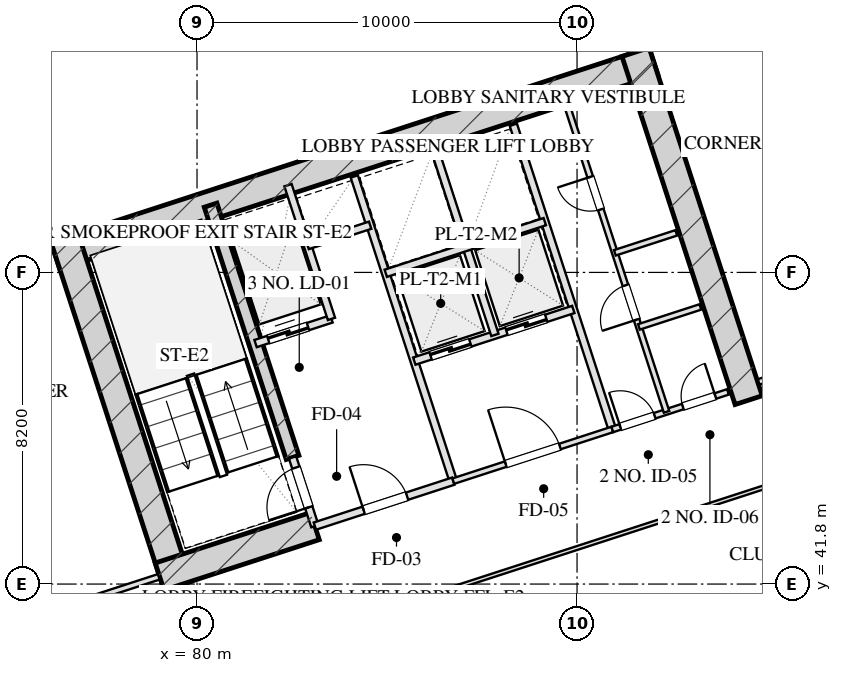
"""IFC4 building model, lengths in metres.
Left out: names, types, materials, properties, quantities, classifications, styles, units other than length and angle.
Written with IfcOpenShell. Run it as: python <this file> out.ifc"""

import sys

from ifc_helpers import new_model, si_unit, direction, frame, frame_2d, origin, place, context, subcontext, project, spatial, rectangle, extrude, element, fill, save


model = new_model("IFC4")
c1 = context("Model", 3, precision=1e-05, world=origin(), true_north=direction((0.0, 1.0)))
c2 = subcontext(c1, "Body", "Model", "MODEL_VIEW")
j1 = project(units=[si_unit("LENGTHUNIT", "METRE"), si_unit("PLANEANGLEUNIT", "RADIAN")], contexts=[c1])
p1 = place(None, origin())
s1 = spatial("IfcSite", under=j1, at=p1, CompositionType="ELEMENT")
p2 = place(p1, origin())
s2 = spatial("IfcBuilding", under=s1, at=p2, CompositionType="ELEMENT")
p3 = place(p2, frame((0.0, 0.0, 81.65)))
s3 = spatial("IfcBuildingStorey", under=s2, at=p3, CompositionType="ELEMENT", Elevation=81.65)
p4 = place(p3, frame((76.272, 50.443, 0.0), z_axis=(0.0, 0.0, 1.0), x_axis=(0.951056072937, 0.309018358888, 0.0)))
e1 = element("IfcWall", 1, at=p4, inside=s3, PredefinedType="SHEAR", context=c2, shape_type="SweptSolid", body=[
    extrude(rectangle(XDim=16.55, YDim=0.75, at=frame_2d((8.275, 0.0))), origin(), (0.0, 0.0, 1.0), 3.45),
])
for number, where, z_axis, x_axis in (
    (2, (79.489, 41.756, 0.0), (0.0, 0.0, 1.0), (-0.309, 0.951, 0.0)),
    (3, (94.515, 46.639, 0.0), (0.0, 0.0, 1.0), (-0.309, 0.951, 0.0)),
):
    element("IfcWall", number, at=place(p3, frame(where, z_axis=z_axis, x_axis=x_axis)), inside=s3, PredefinedType="SHEAR", context=c2, shape_type="SweptSolid", body=[
        extrude(rectangle(XDim=9.63, YDim=0.75, at=frame_2d((4.815, 0.0))), origin(), (0.0, 0.0, 1.0), 3.45),
    ])
p5 = place(p3, frame((82.514, 45.131, 0.0), z_axis=(0.0, 0.0, 1.0), x_axis=(-0.308988790936, 0.951065679686, 0.0)))
e4 = element("IfcWall", 4, at=p5, inside=s3, PredefinedType="SHEAR", context=c2, shape_type="SweptSolid", body=[
    extrude(rectangle(XDim=6.98, YDim=0.35, at=frame_2d((3.49, 0.0))), origin(), (0.0, 0.0, 1.0), 3.45),
])
p6 = place(p3, frame((79.016, 41.997, 0.0), z_axis=(0.0, 0.0, 1.0), x_axis=(0.95106038264, 0.309005094736, 0.0)))
e5 = element("IfcWall", 5, at=p6, inside=s3, PredefinedType="SHEAR", context=c2, shape_type="SweptSolid", body=[
    extrude(rectangle(XDim=4.295, YDim=0.75, at=frame_2d((2.147, 0.0))), origin(), (0.0, 0.0, 1.0), 3.45),
])
p7 = place(p3, frame((80.716, 6.59, 0.0), z_axis=(0.0, 0.0, 1.0), x_axis=(-0.309017542002, 0.95105633836, 0.0)))
e6 = element("IfcWall", 6, at=p7, inside=s3, PredefinedType="SOLIDWALL", context=c2, shape_type="SweptSolid", body=[
    extrude(rectangle(XDim=46.4, YDim=0.4, at=frame_2d((23.2, 0.0))), origin(), (0.0, 0.0, 1.0), 2.61),
])
p8 = place(p7, frame((24.6, 0.0, 0.75)))
e7 = element("IfcOpeningElement", 7, at=p8, cuts=e6, PredefinedType="OPENING", context=c2, shape_type="SweptSolid", body=[
    extrude(rectangle(XDim=2.4, YDim=1.46, at=frame_2d((1.2, 0.73))), frame((0.0, 0.21, 0.0), z_axis=(0.0, -1.0, 0.0), x_axis=(1.0, 0.0, 0.0)), (0.0, 0.0, 1.0), 0.42),
])
p9 = place(p7, frame((28.4, 0.0, 0.75)))
e8 = element("IfcOpeningElement", 8, at=p9, cuts=e6, PredefinedType="OPENING", context=c2, shape_type="SweptSolid", body=[
    extrude(rectangle(XDim=2.4, YDim=1.46, at=frame_2d((1.2, 0.73))), frame((0.0, 0.21, 0.0), z_axis=(0.0, -1.0, 0.0), x_axis=(1.0, 0.0, 0.0)), (0.0, 0.0, 1.0), 0.42),
])
p10 = place(p7, frame((18.25, 0.0, 0.0)))
e9 = element("IfcOpeningElement", 9, at=p10, cuts=e6, PredefinedType="OPENING", context=c2, shape_type="SweptSolid", body=[
    extrude(rectangle(XDim=1.1, YDim=2.15, at=frame_2d((0.55, 1.075))), frame((0.0, 0.21, 0.0), z_axis=(0.0, -1.0, 0.0), x_axis=(1.0, 0.0, 0.0)), (0.0, 0.0, 1.0), 0.42),
])
p11 = place(p3, frame((68.047, 53.995, 0.0), z_axis=(0.0, 0.0, 1.0), x_axis=(0.95105505922, 0.309021478754, 0.0)))
e10 = element("IfcWall", 10, at=p11, inside=s3, PredefinedType="SOLIDWALL", context=c2, shape_type="SweptSolid", body=[
    extrude(rectangle(XDim=29.4, YDim=0.4, at=frame_2d((14.7, 0.0))), origin(), (0.0, 0.0, 1.0), 2.61),
])
p12 = place(p3, frame((83.101, 43.324, 0.0), z_axis=(0.0, 0.0, 1.0), x_axis=(-0.309048298632, 0.951046344356, 0.0)))
e11 = element("IfcWall", 11, at=p12, inside=s3, PredefinedType="PARTITIONING", context=c2, shape_type="SweptSolid", body=[
    extrude(rectangle(XDim=1.9, YDim=0.2, at=frame_2d((0.95, 0.0))), origin(), (0.0, 0.0, 1.0), 3.175),
])
p13 = place(p12, frame((0.52, 0.0, 0.0)))
e12 = element("IfcOpeningElement", 12, at=p13, cuts=e11, PredefinedType="OPENING", context=c2, shape_type="SweptSolid", body=[
    extrude(rectangle(XDim=1.1, YDim=2.05, at=frame_2d((0.55, 1.025))), frame((0.0, 0.11, 0.0), z_axis=(0.0, -1.0, 0.0), x_axis=(1.0, 0.0, 0.0)), (0.0, 0.0, 1.0), 0.22),
])
p14 = place(p3, frame((86.743, 44.508, 0.0), z_axis=(0.0, 0.0, 1.0), x_axis=(-0.309016001439, 0.951056838919, 0.0)))
e13 = element("IfcWall", 13, at=p14, inside=s3, PredefinedType="PARTITIONING", context=c2, shape_type="SweptSolid", body=[
    extrude(rectangle(XDim=8.43, YDim=0.2, at=frame_2d((4.215, 0.0))), origin(), (0.0, 0.0, 1.0), 3.175),
])
p15 = place(p3, frame((83.101, 43.324, 0.0), z_axis=(0.0, 0.0, 1.0), x_axis=(0.951052804469, 0.309028417967, 0.0)))
e14 = element("IfcWall", 14, at=p15, inside=s3, PredefinedType="PARTITIONING", context=c2, shape_type="SweptSolid", body=[
    extrude(rectangle(XDim=3.83, YDim=0.2, at=frame_2d((1.915, 0.0))), origin(), (0.0, 0.0, 1.0), 3.175),
])
p16 = place(p15, frame((1.35, 0.0, 0.0)))
e15 = element("IfcOpeningElement", 15, at=p16, cuts=e14, PredefinedType="OPENING", context=c2, shape_type="SweptSolid", body=[
    extrude(rectangle(XDim=1.2, YDim=2.05, at=frame_2d((0.6, 1.025))), frame((0.0, 0.11, 0.0), z_axis=(0.0, -1.0, 0.0), x_axis=(1.0, 0.0, 0.0)), (0.0, 0.0, 1.0), 0.22),
])
p17 = place(p3, frame((81.54, 48.127, 0.0), z_axis=(0.0, 0.0, 1.0), x_axis=(0.951062257173, 0.308999325213, 0.0)))
e16 = element("IfcWall", 16, at=p17, inside=s3, PredefinedType="PARTITIONING", context=c2, shape_type="SweptSolid", body=[
    extrude(rectangle(XDim=2.1, YDim=0.2, at=frame_2d((1.05, 0.0))), origin(), (0.0, 0.0, 1.0), 3.175),
])
p18 = place(p17, frame((0.35, 0.0, 0.0)))
e17 = element("IfcOpeningElement", 17, at=p18, cuts=e16, PredefinedType="OPENING", context=c2, shape_type="SweptSolid", body=[
    extrude(rectangle(XDim=1.1, YDim=2.05, at=frame_2d((0.55, 1.025))), frame((0.0, 0.11, 0.0), z_axis=(0.0, -1.0, 0.0), x_axis=(1.0, 0.0, 0.0)), (0.0, 0.0, 1.0), 0.22),
])
p19 = place(p3, frame((83.538, 48.776, 0.0), z_axis=(0.0, 0.0, 1.0), x_axis=(-0.3089935693, 0.951064127245, 0.0)))
e18 = element("IfcWall", 18, at=p19, inside=s3, PredefinedType="PARTITIONING", context=c2, shape_type="SweptSolid", body=[
    extrude(rectangle(XDim=3.7, YDim=0.2, at=frame_2d((1.85, 0.0))), origin(), (0.0, 0.0, 1.0), 3.175),
])
p20 = place(p3, frame((82.91, 50.707, 0.0), z_axis=(0.0, 0.0, 1.0), x_axis=(0.951041328149, 0.309063734775, 0.0)))
e19 = element("IfcWall", 19, at=p20, inside=s3, PredefinedType="PARTITIONING", context=c2, shape_type="SweptSolid", body=[
    extrude(rectangle(XDim=1.73, YDim=0.2, at=frame_2d((0.865, 0.0))), origin(), (0.0, 0.0, 1.0), 3.175),
])
p21 = place(p3, frame((90.928, 45.868, 0.0), z_axis=(0.0, 0.0, 1.0), x_axis=(-0.309042196757, 0.951048327176, 0.0)))
e20 = element("IfcWall", 20, at=p21, inside=s3, PredefinedType="PARTITIONING", context=c2, shape_type="SweptSolid", body=[
    extrude(rectangle(XDim=8.43, YDim=0.2, at=frame_2d((4.215, 0.0))), origin(), (0.0, 0.0, 1.0), 3.175),
])
p22 = place(p3, frame((86.743, 44.508, 0.0), z_axis=(0.0, 0.0, 1.0), x_axis=(0.951063829732, 0.308994485023, 0.0)))
e21 = element("IfcWall", 21, at=p22, inside=s3, PredefinedType="PARTITIONING", context=c2, shape_type="SweptSolid", body=[
    extrude(rectangle(XDim=4.4, YDim=0.15, at=frame_2d((2.2, 0.0))), origin(), (0.0, 0.0, 1.0), 3.175),
])
p23 = place(p22, frame((1.45, 0.0, 0.0)))
e22 = element("IfcOpeningElement", 22, at=p23, cuts=e21, PredefinedType="OPENING", context=c2, shape_type="SweptSolid", body=[
    extrude(rectangle(XDim=1.5, YDim=2.05, at=frame_2d((0.75, 1.025))), frame((0.0, 0.085, 0.0), z_axis=(0.0, -1.0, 0.0), x_axis=(1.0, 0.0, 0.0)), (0.0, 0.0, 1.0), 0.17),
])
p24 = place(p3, frame((85.718, 47.666, 0.0), z_axis=(0.0, 0.0, 1.0), x_axis=(0.951058531764, 0.30901079133, 0.0)))
e23 = element("IfcWall", 23, at=p24, inside=s3, PredefinedType="PARTITIONING", context=c2, shape_type="SweptSolid", body=[
    extrude(rectangle(XDim=4.4, YDim=0.2, at=frame_2d((2.2, 0.0))), origin(), (0.0, 0.0, 1.0), 3.175),
])
p25 = place(p24, frame((0.45, 0.0, 0.0)))
e24 = element("IfcOpeningElement", 24, at=p25, cuts=e23, PredefinedType="OPENING", context=c2, shape_type="SweptSolid", body=[
    extrude(rectangle(XDim=1.1, YDim=2.05, at=frame_2d((0.55, 1.025))), frame((0.0, 0.11, 0.0), z_axis=(0.0, -1.0, 0.0), x_axis=(1.0, 0.0, 0.0)), (0.0, 0.0, 1.0), 0.22),
])
p26 = place(p24, frame((2.55, 0.0, 0.0)))
e25 = element("IfcOpeningElement", 25, at=p26, cuts=e23, PredefinedType="OPENING", context=c2, shape_type="SweptSolid", body=[
    extrude(rectangle(XDim=1.1, YDim=2.05, at=frame_2d((0.55, 1.025))), frame((0.0, 0.11, 0.0), z_axis=(0.0, -1.0, 0.0), x_axis=(1.0, 0.0, 0.0)), (0.0, 0.0, 1.0), 0.22),
])
p27 = place(p3, frame((87.838, 48.354, 0.0), z_axis=(0.0, 0.0, 1.0), x_axis=(-0.3090093719, 0.951058992953, 0.0)))
e26 = element("IfcWall", 26, at=p27, inside=s3, PredefinedType="PARTITIONING", context=c2, shape_type="SweptSolid", body=[
    extrude(rectangle(XDim=5.11, YDim=0.2, at=frame_2d((2.555, 0.0))), origin(), (0.0, 0.0, 1.0), 3.175),
])
p28 = place(p3, frame((84.967, 49.977, 0.0), z_axis=(0.0, 0.0, 1.0), x_axis=(0.951063829732, 0.308994485023, 0.0)))
e27 = element("IfcWall", 27, at=p28, inside=s3, PredefinedType="PARTITIONING", context=c2, shape_type="SweptSolid", body=[
    extrude(rectangle(XDim=4.4, YDim=0.2, at=frame_2d((2.2, 0.0))), origin(), (0.0, 0.0, 1.0), 3.175),
])
p29 = place(p3, frame((90.928, 45.868, 0.0), z_axis=(0.0, 0.0, 1.0), x_axis=(0.951059297078, 0.309008435874, 0.0)))
e28 = element("IfcWall", 28, at=p29, inside=s3, PredefinedType="PARTITIONING", context=c2, shape_type="SweptSolid", body=[
    extrude(rectangle(XDim=3.2, YDim=0.15, at=frame_2d((1.6, 0.0))), origin(), (0.0, 0.0, 1.0), 3.175),
])
p30 = place(p29, frame((0.22, 0.0, 0.0)))
e29 = element("IfcOpeningElement", 29, at=p30, cuts=e28, PredefinedType="OPENING", context=c2, shape_type="SweptSolid", body=[
    extrude(rectangle(XDim=0.95, YDim=2.05, at=frame_2d((0.475, 1.025))), frame((0.0, 0.085, 0.0), z_axis=(0.0, -1.0, 0.0), x_axis=(1.0, 0.0, 0.0)), (0.0, 0.0, 1.0), 0.17),
])
p31 = place(p29, frame((1.95, 0.0, 0.0)))
e30 = element("IfcOpeningElement", 30, at=p31, cuts=e28, PredefinedType="OPENING", context=c2, shape_type="SweptSolid", body=[
    extrude(rectangle(XDim=0.9, YDim=2.05, at=frame_2d((0.45, 1.025))), frame((0.0, 0.085, 0.0), z_axis=(0.0, -1.0, 0.0), x_axis=(1.0, 0.0, 0.0)), (0.0, 0.0, 1.0), 0.17),
])
p32 = place(p3, frame((92.355, 46.331, 0.0), z_axis=(0.0, 0.0, 1.0), x_axis=(-0.309007490203, 0.951059604335, 0.0)))
e31 = element("IfcWall", 31, at=p32, inside=s3, PredefinedType="PARTITIONING", context=c2, shape_type="SweptSolid", body=[
    extrude(rectangle(XDim=8.43, YDim=0.15, at=frame_2d((4.215, 0.0))), origin(), (0.0, 0.0, 1.0), 3.175),
])
p33 = place(p32, frame((2.55, 0.0, 0.0)))
e32 = element("IfcOpeningElement", 32, at=p33, cuts=e31, PredefinedType="OPENING", context=c2, shape_type="SweptSolid", body=[
    extrude(rectangle(XDim=0.95, YDim=2.05, at=frame_2d((0.475, 1.025))), frame((0.0, 0.085, 0.0), z_axis=(0.0, -1.0, 0.0), x_axis=(1.0, 0.0, 0.0)), (0.0, 0.0, 1.0), 0.17),
])
p34 = place(p32, frame((5.6, 0.0, 0.0)))
e33 = element("IfcOpeningElement", 33, at=p34, cuts=e31, PredefinedType="OPENING", context=c2, shape_type="SweptSolid", body=[
    extrude(rectangle(XDim=0.9, YDim=2.05, at=frame_2d((0.45, 1.025))), frame((0.0, 0.085, 0.0), z_axis=(0.0, -1.0, 0.0), x_axis=(1.0, 0.0, 0.0)), (0.0, 0.0, 1.0), 0.17),
])
p35 = place(p3, frame((90.995, 50.516, 0.0), z_axis=(0.0, 0.0, 1.0), x_axis=(0.951040401051, 0.309066587596, 0.0)))
e34 = element("IfcWall", 34, at=p35, inside=s3, PredefinedType="PARTITIONING", context=c2, shape_type="SweptSolid", body=[
    extrude(rectangle(XDim=1.7, YDim=0.15, at=frame_2d((0.85, 0.0))), origin(), (0.0, 0.0, 1.0), 3.175),
])
p36 = place(p3, frame((91.628, 48.566, 0.0), z_axis=(0.0, 0.0, 1.0), x_axis=(0.951054116971, 0.309024378638, 0.0)))
e35 = element("IfcWall", 35, at=p36, inside=s3, PredefinedType="PARTITIONING", context=c2, shape_type="SweptSolid", body=[
    extrude(rectangle(XDim=1.7, YDim=0.15, at=frame_2d((0.85, 0.0))), origin(), (0.0, 0.0, 1.0), 3.175),
])
p37 = place(p3, frame((70.338, 39.177, 0.0), z_axis=(0.0, 0.0, 1.0), x_axis=(0.951059695568, 0.309007209409, 0.0)))
e36 = element("IfcWall", 36, at=p37, inside=s3, PredefinedType="PARTITIONING", context=c2, shape_type="SweptSolid", body=[
    extrude(rectangle(XDim=9.1, YDim=0.15, at=frame_2d((4.55, 0.0))), origin(), (0.0, 0.0, 1.0), 3.175),
])
p38 = place(p37, frame((3.822, 0.0, 0.0)))
e37 = element("IfcOpeningElement", 37, at=p38, cuts=e36, PredefinedType="OPENING", context=c2, shape_type="SweptSolid", body=[
    extrude(rectangle(XDim=1.0, YDim=2.05, at=frame_2d((0.5, 1.025))), frame((0.0, 0.085, 0.0), z_axis=(0.0, -1.0, 0.0), x_axis=(1.0, 0.0, 0.0)), (0.0, 0.0, 1.0), 0.17),
])
p39 = place(p3, frame((94.78, 47.119, 0.0), z_axis=(0.0, 0.0, 1.0), x_axis=(0.951054329824, 0.309023723562, 0.0)))
e38 = element("IfcWall", 38, at=p39, inside=s3, PredefinedType="PARTITIONING", context=c2, shape_type="SweptSolid", body=[
    extrude(rectangle(XDim=8.5, YDim=0.15, at=frame_2d((4.25, 0.0))), origin(), (0.0, 0.0, 1.0), 3.175),
])
p40 = place(p39, frame((3.57, 0.0, 0.0)))
e39 = element("IfcOpeningElement", 39, at=p40, cuts=e38, PredefinedType="OPENING", context=c2, shape_type="SweptSolid", body=[
    extrude(rectangle(XDim=1.05, YDim=2.05, at=frame_2d((0.525, 1.025))), frame((0.0, 0.085, 0.0), z_axis=(0.0, -1.0, 0.0), x_axis=(1.0, 0.0, 0.0)), (0.0, 0.0, 1.0), 0.17),
])
p41 = place(p3, frame((86.692, 41.673, 0.0), z_axis=(0.0, 0.0, 1.0), x_axis=(0.951057050993, 0.309015348739, 0.0)))
e40 = element("IfcWall", 40, at=p41, inside=s3, PredefinedType="MOVABLE", context=c2, shape_type="SweptSolid", body=[
    extrude(rectangle(XDim=17.875, YDim=0.1, at=frame_2d((8.938, 0.0))), origin(), (0.0, 0.0, 1.0), 3.175),
])
p42 = place(p3, frame((91.834, 25.848, 0.0), z_axis=(0.0, 0.0, 1.0), x_axis=(-0.30901773025, 0.951056277195, 0.0)))
e41 = element("IfcWall", 41, at=p42, inside=s3, PredefinedType="MOVABLE", context=c2, shape_type="SweptSolid", body=[
    extrude(rectangle(XDim=16.64, YDim=0.1, at=frame_2d((8.32, 0.0))), origin(), (0.0, 0.0, 1.0), 3.175),
])
p43 = place(p42, frame((1.16, 0.0, 0.0)))
e42 = element("IfcOpeningElement", 42, at=p43, cuts=e41, PredefinedType="OPENING", context=c2, shape_type="SweptSolid", body=[
    extrude(rectangle(XDim=1.0, YDim=2.05, at=frame_2d((0.5, 1.025))), frame((0.0, 0.06, 0.0), z_axis=(0.0, -1.0, 0.0), x_axis=(1.0, 0.0, 0.0)), (0.0, 0.0, 1.0), 0.12),
])
p44 = place(p42, frame((5.48, 0.0, 0.0)))
e43 = element("IfcOpeningElement", 43, at=p44, cuts=e41, PredefinedType="OPENING", context=c2, shape_type="SweptSolid", body=[
    extrude(rectangle(XDim=0.85, YDim=2.05, at=frame_2d((0.425, 1.025))), frame((0.0, 0.06, 0.0), z_axis=(0.0, -1.0, 0.0), x_axis=(1.0, 0.0, 0.0)), (0.0, 0.0, 1.0), 0.12),
])
p45 = place(p42, frame((8.08, 0.0, 0.0)))
e44 = element("IfcOpeningElement", 44, at=p45, cuts=e41, PredefinedType="OPENING", context=c2, shape_type="SweptSolid", body=[
    extrude(rectangle(XDim=1.0, YDim=2.05, at=frame_2d((0.5, 1.025))), frame((0.0, 0.06, 0.0), z_axis=(0.0, -1.0, 0.0), x_axis=(1.0, 0.0, 0.0)), (0.0, 0.0, 1.0), 0.12),
])
p46 = place(p42, frame((10.874, 0.0, 0.0)))
e45 = element("IfcOpeningElement", 45, at=p46, cuts=e41, PredefinedType="OPENING", context=c2, shape_type="SweptSolid", body=[
    extrude(rectangle(XDim=1.0, YDim=2.05, at=frame_2d((0.5, 1.025))), frame((0.0, 0.06, 0.0), z_axis=(0.0, -1.0, 0.0), x_axis=(1.0, 0.0, 0.0)), (0.0, 0.0, 1.0), 0.12),
])
p47 = place(p42, frame((14.174, 0.0, 0.0)))
e46 = element("IfcOpeningElement", 46, at=p47, cuts=e41, PredefinedType="OPENING", context=c2, shape_type="SweptSolid", body=[
    extrude(rectangle(XDim=1.05, YDim=2.05, at=frame_2d((0.525, 1.025))), frame((0.0, 0.06, 0.0), z_axis=(0.0, -1.0, 0.0), x_axis=(1.0, 0.0, 0.0)), (0.0, 0.0, 1.0), 0.12),
])
p48 = place(p3, frame((87.746, 38.429, 0.0), z_axis=(0.0, 0.0, 1.0), x_axis=(0.951057050993, 0.309015348739, 0.0)))
e47 = element("IfcWall", 47, at=p48, inside=s3, PredefinedType="MOVABLE", context=c2, shape_type="SweptSolid", body=[
    extrude(rectangle(XDim=17.875, YDim=0.1, at=frame_2d((8.938, 0.0))), origin(), (0.0, 0.0, 1.0), 3.175),
])
p49 = place(p13, origin())
e48 = element("IfcDoor", 48, at=p49, inside=s3, OperationType="SINGLE_SWING_LEFT", PredefinedType="DOOR", context=c2, shape_type="SweptSolid", body=[
    extrude(rectangle(XDim=1.1, YDim=2.05, at=frame_2d((0.55, 1.025))), frame((0.0, 0.025, 0.0), z_axis=(0.0, -1.0, 0.0), x_axis=(1.0, 0.0, 0.0)), (0.0, 0.0, 1.0), 0.05),
])
fill(e12, e48)
p50 = place(p16, origin())
e49 = element("IfcDoor", 49, at=p50, inside=s3, OperationType="SINGLE_SWING_LEFT", PredefinedType="DOOR", context=c2, shape_type="SweptSolid", body=[
    extrude(rectangle(XDim=1.2, YDim=2.05, at=frame_2d((0.6, 1.025))), frame((0.0, 0.025, 0.0), z_axis=(0.0, -1.0, 0.0), x_axis=(1.0, 0.0, 0.0)), (0.0, 0.0, 1.0), 0.05),
])
fill(e15, e49)
p51 = place(p18, origin())
e50 = element("IfcDoor", 50, at=p51, inside=s3, OperationType="DOUBLE_DOOR_SLIDING", PredefinedType="DOOR", context=c2, shape_type="SweptSolid", body=[
    extrude(rectangle(XDim=1.1, YDim=2.05, at=frame_2d((0.55, 1.025))), frame((0.0, 0.025, 0.0), z_axis=(0.0, -1.0, 0.0), x_axis=(1.0, 0.0, 0.0)), (0.0, 0.0, 1.0), 0.05),
])
fill(e17, e50)
p52 = place(p23, origin())
e51 = element("IfcDoor", 51, at=p52, inside=s3, OperationType="SINGLE_SWING_LEFT", PredefinedType="DOOR", context=c2, shape_type="SweptSolid", body=[
    extrude(rectangle(XDim=1.5, YDim=2.05, at=frame_2d((0.75, 1.025))), frame((0.0, 0.025, 0.0), z_axis=(0.0, -1.0, 0.0), x_axis=(1.0, 0.0, 0.0)), (0.0, 0.0, 1.0), 0.05),
])
fill(e22, e51)
p53 = place(p25, origin())
e52 = element("IfcDoor", 52, at=p53, inside=s3, OperationType="DOUBLE_DOOR_SLIDING", PredefinedType="DOOR", context=c2, shape_type="SweptSolid", body=[
    extrude(rectangle(XDim=1.1, YDim=2.05, at=frame_2d((0.55, 1.025))), frame((0.0, 0.025, 0.0), z_axis=(0.0, -1.0, 0.0), x_axis=(1.0, 0.0, 0.0)), (0.0, 0.0, 1.0), 0.05),
])
fill(e24, e52)
p54 = place(p26, origin())
e53 = element("IfcDoor", 53, at=p54, inside=s3, OperationType="DOUBLE_DOOR_SLIDING", PredefinedType="DOOR", context=c2, shape_type="SweptSolid", body=[
    extrude(rectangle(XDim=1.1, YDim=2.05, at=frame_2d((0.55, 1.025))), frame((0.0, 0.025, 0.0), z_axis=(0.0, -1.0, 0.0), x_axis=(1.0, 0.0, 0.0)), (0.0, 0.0, 1.0), 0.05),
])
fill(e25, e53)
p55 = place(p30, origin())
e54 = element("IfcDoor", 54, at=p55, inside=s3, OperationType="SINGLE_SWING_LEFT", PredefinedType="DOOR", context=c2, shape_type="SweptSolid", body=[
    extrude(rectangle(XDim=0.95, YDim=2.05, at=frame_2d((0.475, 1.025))), frame((0.0, 0.025, 0.0), z_axis=(0.0, -1.0, 0.0), x_axis=(1.0, 0.0, 0.0)), (0.0, 0.0, 1.0), 0.05),
])
fill(e29, e54)
p56 = place(p31, origin())
e55 = element("IfcDoor", 55, at=p56, inside=s3, OperationType="SINGLE_SWING_RIGHT", PredefinedType="DOOR", context=c2, shape_type="SweptSolid", body=[
    extrude(rectangle(XDim=0.9, YDim=2.05, at=frame_2d((0.45, 1.025))), frame((0.0, 0.025, 0.0), z_axis=(0.0, -1.0, 0.0), x_axis=(1.0, 0.0, 0.0)), (0.0, 0.0, 1.0), 0.05),
])
fill(e30, e55)
p57 = place(p33, origin())
e56 = element("IfcDoor", 56, at=p57, inside=s3, OperationType="SINGLE_SWING_LEFT", PredefinedType="DOOR", context=c2, shape_type="SweptSolid", body=[
    extrude(rectangle(XDim=0.95, YDim=2.05, at=frame_2d((0.475, 1.025))), frame((0.0, 0.025, 0.0), z_axis=(0.0, -1.0, 0.0), x_axis=(1.0, 0.0, 0.0)), (0.0, 0.0, 1.0), 0.05),
])
fill(e32, e56)
p58 = place(p34, origin())
e57 = element("IfcDoor", 57, at=p58, inside=s3, OperationType="SINGLE_SWING_RIGHT", PredefinedType="DOOR", context=c2, shape_type="SweptSolid", body=[
    extrude(rectangle(XDim=0.9, YDim=2.05, at=frame_2d((0.45, 1.025))), frame((0.0, 0.025, 0.0), z_axis=(0.0, -1.0, 0.0), x_axis=(1.0, 0.0, 0.0)), (0.0, 0.0, 1.0), 0.05),
])
fill(e33, e57)
save(model, sys.argv[1])
